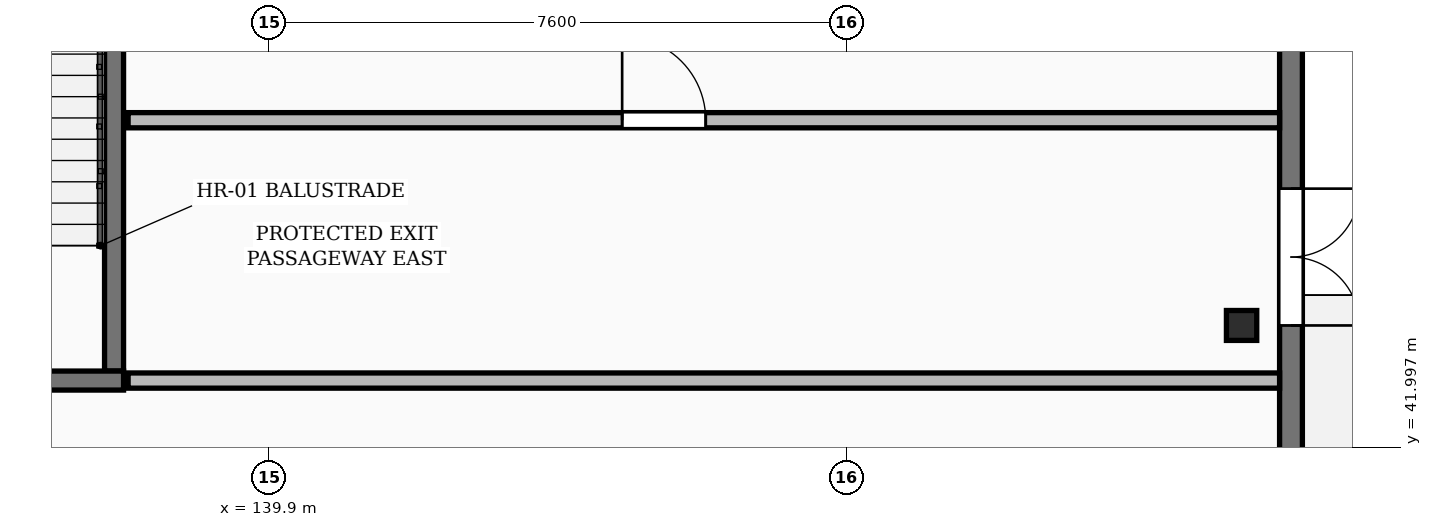
"""IFC4 building model, lengths in metres.
Left out: names, types, materials, properties, quantities, classifications, styles, units other than length and angle.
Written with IfcOpenShell. Run it as: python <this file> out.ifc"""

import sys

from ifc_helpers import new_model, si_unit, direction, frame, frame_2d, origin, origin_2d, place, context, subcontext, project, spatial, rectangle, i_section, extrude, element, fill, save


model = new_model("IFC4")
c1 = context("Model", 3, precision=1e-05, world=origin(), true_north=direction((0.0, 1.0)))
c2 = subcontext(c1, "Body", "Model", "MODEL_VIEW")
j1 = project(units=[si_unit("LENGTHUNIT", "METRE"), si_unit("PLANEANGLEUNIT", "RADIAN")], contexts=[c1])
p1 = place(None, origin())
s1 = spatial("IfcSite", under=j1, at=p1, CompositionType="ELEMENT")
p2 = place(p1, origin())
s2 = spatial("IfcBuilding", under=s1, at=p2, CompositionType="ELEMENT")
p3 = place(p2, origin())
s3 = spatial("IfcBuildingStorey", under=s2, at=p3, CompositionType="ELEMENT", Elevation=0.0)
p4 = place(p3, frame((152.7, 43.6, 0.0), z_axis=(0.0, 0.0, 1.0), x_axis=(1.0, 0.0, 0.0)))
e1 = element("IfcColumn", 1, at=p4, inside=s3, PredefinedType="COLUMN", context=c2, shape_type="SweptSolid", body=[
    extrude(i_section(OverallWidth=0.399, OverallDepth=0.394, WebThickness=0.023, FlangeThickness=0.037, FilletRadius=0.015, at=origin_2d()), origin(), (0.0, 0.0, 1.0), 5.4),
])
p5 = place(p3, frame((153.35, -26.5, 0.0), z_axis=(0.0, 0.0, 1.0), x_axis=(0.0, 1.0, 0.0)))
e2 = element("IfcWall", 2, at=p5, inside=s3, PredefinedType="STANDARD", context=c2, shape_type="SweptSolid", body=[
    extrude(rectangle(XDim=135.7, YDim=0.3, at=frame_2d((67.85, 0.0))), origin(), (0.0, 0.0, 1.0), 5.1),
])
p6 = place(p5, frame((60.8, 0.0, 0.0)))
e3 = element("IfcOpeningElement", 3, at=p6, cuts=e2, PredefinedType="OPENING", context=c2, shape_type="SweptSolid", body=[
    extrude(rectangle(XDim=7.2, YDim=3.2, at=frame_2d((3.6, 1.6))), frame((0.0, 0.16, 0.0), z_axis=(0.0, -1.0, 0.0), x_axis=(1.0, 0.0, 0.0)), (0.0, 0.0, 1.0), 0.32),
])
p7 = place(p5, frame((70.1, 0.0, 0.0)))
e4 = element("IfcOpeningElement", 4, at=p7, cuts=e2, PredefinedType="OPENING", context=c2, shape_type="SweptSolid", body=[
    extrude(rectangle(XDim=1.8, YDim=2.2, at=frame_2d((0.9, 1.1))), frame((0.0, 0.16, 0.0), z_axis=(0.0, -1.0, 0.0), x_axis=(1.0, 0.0, 0.0)), (0.0, 0.0, 1.0), 0.32),
])
p8 = place(p5, frame((77.5, 0.0, 0.0)))
e5 = element("IfcOpeningElement", 5, at=p8, cuts=e2, PredefinedType="OPENING", context=c2, shape_type="SweptSolid", body=[
    extrude(rectangle(XDim=4.2, YDim=3.6, at=frame_2d((2.1, 1.8))), frame((0.0, 0.16, 0.0), z_axis=(0.0, -1.0, 0.0), x_axis=(1.0, 0.0, 0.0)), (0.0, 0.0, 1.0), 0.32),
])
p9 = place(p5, frame((11.0, 0.0, 0.0)))
e6 = element("IfcOpeningElement", 6, at=p9, cuts=e2, PredefinedType="OPENING", context=c2, shape_type="SweptSolid", body=[
    extrude(rectangle(XDim=1.8, YDim=2.2, at=frame_2d((0.9, 1.1))), frame((0.0, 0.16, 0.0), z_axis=(0.0, -1.0, 0.0), x_axis=(1.0, 0.0, 0.0)), (0.0, 0.0, 1.0), 0.32),
])
p10 = place(p5, frame((105.8, 0.0, 0.0)))
e7 = element("IfcOpeningElement", 7, at=p10, cuts=e2, PredefinedType="OPENING", context=c2, shape_type="SweptSolid", body=[
    extrude(rectangle(XDim=1.8, YDim=2.2, at=frame_2d((0.9, 1.1))), frame((0.0, 0.16, 0.0), z_axis=(0.0, -1.0, 0.0), x_axis=(1.0, 0.0, 0.0)), (0.0, 0.0, 1.0), 0.32),
])
p11 = place(p3, frame((137.865, 43.0, 0.0), z_axis=(0.0, 0.0, 1.0), x_axis=(0.0, 1.0, 0.0)))
e8 = element("IfcWall", 8, at=p11, inside=s3, PredefinedType="SHEAR", context=c2, shape_type="SweptSolid", body=[
    extrude(rectangle(XDim=7.6, YDim=0.25, at=frame_2d((3.8, 0.0))), origin(), (0.0, 0.0, 1.0), 5.4),
])
p12 = place(p3, frame((134.25, 42.875, 0.0), z_axis=(0.0, 0.0, 1.0), x_axis=(1.0, 0.0, 0.0)))
e9 = element("IfcWall", 9, at=p12, inside=s3, PredefinedType="SHEAR", context=c2, shape_type="SweptSolid", body=[
    extrude(rectangle(XDim=3.74, YDim=0.25, at=frame_2d((1.87, 0.0))), origin(), (0.0, 0.0, 1.0), 5.4),
])
p13 = place(p3, frame((138.05, 46.3, 0.0), z_axis=(0.0, 0.0, 1.0), x_axis=(1.0, 0.0, 0.0)))
e10 = element("IfcWall", 10, at=p13, inside=s3, PredefinedType="PARTITIONING", context=c2, shape_type="SweptSolid", body=[
    extrude(rectangle(XDim=15.15, YDim=0.2, at=frame_2d((7.575, 0.0))), origin(), (0.0, 0.0, 1.0), 5.1),
])
p14 = place(p13, frame((6.5, 0.0, 0.0)))
e11 = element("IfcOpeningElement", 11, at=p14, cuts=e10, PredefinedType="OPENING", context=c2, shape_type="SweptSolid", body=[
    extrude(rectangle(XDim=1.1, YDim=2.1, at=frame_2d((0.55, 1.05))), frame((0.0, 0.11, 0.0), z_axis=(0.0, -1.0, 0.0), x_axis=(1.0, 0.0, 0.0)), (0.0, 0.0, 1.0), 0.22),
])
p15 = place(p3, frame((138.05, 42.875, 0.0), z_axis=(0.0, 0.0, 1.0), x_axis=(1.0, 0.0, 0.0)))
e12 = element("IfcWall", 12, at=p15, inside=s3, PredefinedType="PARTITIONING", context=c2, shape_type="SweptSolid", body=[
    extrude(rectangle(XDim=15.15, YDim=0.2, at=frame_2d((7.575, 0.0))), origin(), (0.0, 0.0, 1.0), 5.1),
])
p16 = place(p7, frame((1.8, 0.0, 0.0), z_axis=(0.0, 0.0, 1.0), x_axis=(-1.0, 0.0, 0.0)))
e13 = element("IfcDoor", 13, at=p16, inside=s3, OperationType="DOUBLE_DOOR_SINGLE_SWING", PredefinedType="DOOR", context=c2, shape_type="SweptSolid", body=[
    extrude(rectangle(XDim=1.8, YDim=2.2, at=frame_2d((0.9, 1.1))), frame((0.0, 0.025, 0.0), z_axis=(0.0, -1.0, 0.0), x_axis=(1.0, 0.0, 0.0)), (0.0, 0.0, 1.0), 0.05),
])
fill(e4, e13)
p17 = place(p14, origin())
e14 = element("IfcDoor", 14, at=p17, inside=s3, OperationType="SINGLE_SWING_LEFT", PredefinedType="DOOR", context=c2, shape_type="SweptSolid", body=[
    extrude(rectangle(XDim=1.1, YDim=2.1, at=frame_2d((0.55, 1.05))), frame((0.0, 0.025, 0.0), z_axis=(0.0, -1.0, 0.0), x_axis=(1.0, 0.0, 0.0)), (0.0, 0.0, 1.0), 0.05),
])
fill(e11, e14)
save(model, sys.argv[1])
